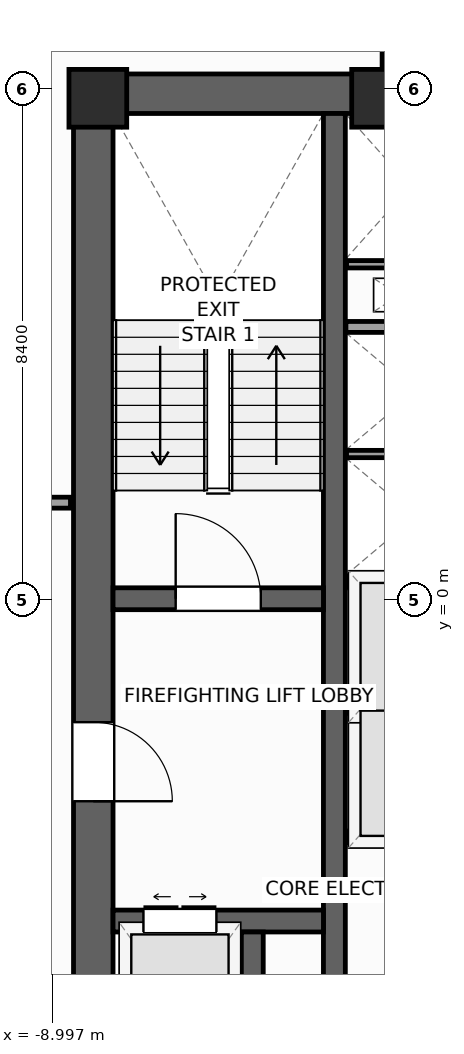
"""IFC4 building model, lengths in metres.
Left out: names, types, materials, properties, quantities, classifications, styles, units other than length and angle.
Written with IfcOpenShell. Run it as: python <this file> out.ifc"""

import sys

from ifc_helpers import new_model, si_unit, direction, frame, frame_2d, origin, origin_2d, place, context, subcontext, project, spatial, rectangle, extrude, source, transform, mapped, element, fill, save


model = new_model("IFC4")
c1 = context("Model", 3, precision=1e-05, world=origin(), true_north=direction((0.0, 1.0)))
c2 = subcontext(c1, "Body", "Model", "MODEL_VIEW")
j1 = project(units=[si_unit("LENGTHUNIT", "METRE"), si_unit("PLANEANGLEUNIT", "RADIAN")], contexts=[c1])
p1 = place(None, origin())
s1 = spatial("IfcSite", under=j1, at=p1, CompositionType="ELEMENT")
p2 = place(p1, origin())
s2 = spatial("IfcBuilding", under=s1, at=p2, CompositionType="ELEMENT")
p3 = place(p2, frame((0.0, 0.0, 160.4)))
s3 = spatial("IfcBuildingStorey", under=s2, at=p3, CompositionType="ELEMENT", Elevation=160.4)
p4 = place(p3, frame((-8.65, 8.325, 0.0), z_axis=(0.0, 0.0, 1.0), x_axis=(1.0, 0.0, 0.0)))
e1 = element("IfcWall", 1, at=p4, inside=s3, PredefinedType="SHEAR", context=c2, shape_type="SweptSolid", body=[
    extrude(rectangle(XDim=17.3, YDim=0.65, at=frame_2d((8.65, 0.0))), origin(), (0.0, 0.0, 1.0), 4.0),
])
p5 = place(p3, frame((-8.325, -8.0, 0.0), z_axis=(0.0, 0.0, 1.0), x_axis=(0.0, 1.0, 0.0)))
e2 = element("IfcWall", 2, at=p5, inside=s3, PredefinedType="SHEAR", context=c2, shape_type="SweptSolid", body=[
    extrude(rectangle(XDim=16.0, YDim=0.65, at=frame_2d((8.0, 0.0))), origin(), (0.0, 0.0, 1.0), 4.0),
])
p6 = place(p5, frame((4.69, 0.0, 0.0)))
e3 = element("IfcOpeningElement", 3, at=p6, cuts=e2, PredefinedType="OPENING", context=c2, shape_type="SweptSolid", body=[
    extrude(rectangle(XDim=1.3, YDim=2.2, at=frame_2d((0.65, 1.1))), frame((0.0, 0.335, 0.0), z_axis=(0.0, -1.0, 0.0), x_axis=(1.0, 0.0, 0.0)), (0.0, 0.0, 1.0), 0.67),
])
p7 = place(p3, frame((-4.36, -8.0, 0.0), z_axis=(0.0, 0.0, 1.0), x_axis=(0.0, 1.0, 0.0)))
e4 = element("IfcWall", 4, at=p7, inside=s3, PredefinedType="SHEAR", context=c2, shape_type="SweptSolid", body=[
    extrude(rectangle(XDim=16.0, YDim=0.36, at=frame_2d((8.0, 0.0))), origin(), (0.0, 0.0, 1.0), 4.0),
])
p8 = place(p3, frame((-8.0, 0.02, 0.0), z_axis=(0.0, 0.0, 1.0), x_axis=(1.0, 0.0, 0.0)))
e5 = element("IfcWall", 5, at=p8, inside=s3, PredefinedType="SHEAR", context=c2, shape_type="SweptSolid", body=[
    extrude(rectangle(XDim=3.46, YDim=0.36, at=frame_2d((1.73, 0.0))), origin(), (0.0, 0.0, 1.0), 4.0),
])
p9 = place(p8, frame((1.03, 0.0, 0.0)))
e6 = element("IfcOpeningElement", 6, at=p9, cuts=e5, PredefinedType="OPENING", context=c2, shape_type="SweptSolid", body=[
    extrude(rectangle(XDim=1.4, YDim=2.2, at=frame_2d((0.7, 1.1))), frame((0.0, 0.19, 0.0), z_axis=(0.0, -1.0, 0.0), x_axis=(1.0, 0.0, 0.0)), (0.0, 0.0, 1.0), 0.38),
])
p10 = place(p3, frame((-8.0, -5.28, 0.0), z_axis=(0.0, 0.0, 1.0), x_axis=(1.0, 0.0, 0.0)))
e7 = element("IfcWall", 7, at=p10, inside=s3, PredefinedType="SHEAR", context=c2, shape_type="SweptSolid", body=[
    extrude(rectangle(XDim=3.46, YDim=0.36, at=frame_2d((1.73, 0.0))), origin(), (0.0, 0.0, 1.0), 4.0),
])
p11 = place(p10, frame((0.5, 0.0, 0.0)))
e8 = element("IfcOpeningElement", 8, at=p11, cuts=e7, PredefinedType="OPENING", context=c2, shape_type="SweptSolid", body=[
    extrude(rectangle(XDim=1.2, YDim=2.25, at=frame_2d((0.6, 1.125))), frame((0.0, 0.19, 0.0), z_axis=(0.0, -1.0, 0.0), x_axis=(1.0, 0.0, 0.0)), (0.0, 0.0, 1.0), 0.38),
])
p12 = place(p3, frame((-5.71, -8.0, 0.0), z_axis=(0.0, 0.0, 1.0), x_axis=(0.0, 1.0, 0.0)))
e9 = element("IfcWall", 9, at=p12, inside=s3, PredefinedType="SHEAR", context=c2, shape_type="SweptSolid", body=[
    extrude(rectangle(XDim=2.54, YDim=0.36, at=frame_2d((1.27, 0.0))), origin(), (0.0, 0.0, 1.0), 4.0),
])
m1 = source(origin(), c2, "Body", "SweptSolid", [
    extrude(rectangle(XDim=0.95, YDim=0.95, at=origin_2d()), origin(), (0.0, 0.0, 1.0), 4.0),
])
for number, where, z_axis, x_axis in (
    (10, (-8.25, 8.25, 0.0), (0.0, 0.0, 1.0), (1.0, 0.0, 0.0)),
    (11, (-3.6, 8.25, 0.0), (0.0, 0.0, 1.0), (1.0, 0.0, 0.0)),
):
    element("IfcColumn", number, at=place(p3, frame(where, z_axis=z_axis, x_axis=x_axis)), inside=s3, PredefinedType="PILASTER", context=c2, shape_type="MappedRepresentation", body=[
        mapped(m1, transform((0.0, 0.0, 0.0), scale=1.0)),
    ])
for number, where, z_axis, x_axis in (
    (12, (-4.17, -3.9, 0.0), (0.0, 0.0, 1.0), (1.0, 0.0, 0.0)),
    (13, (-4.17, 0.3, 0.0), (0.0, 0.0, 1.0), (1.0, 0.0, 0.0)),
    (14, (-4.17, 4.49, 0.0), (0.0, 0.0, 1.0), (1.0, 0.0, 0.0)),
):
    element("IfcWall", number, at=place(p3, frame(where, z_axis=z_axis, x_axis=x_axis)), inside=s3, PredefinedType="PARTITIONING", context=c2, shape_type="SweptSolid", body=[
        extrude(rectangle(XDim=2.28, YDim=0.18, at=frame_2d((1.14, 0.0))), origin(), (0.0, 0.0, 1.0), 3.74),
    ])
for number, where, z_axis, x_axis in (
    (15, (-4.16, -1.8, 0.0), (0.0, 0.0, 1.0), (1.0, 0.0, 0.0)),
    (16, (-4.16, 2.4, 0.0), (0.0, 0.0, 1.0), (1.0, 0.0, 0.0)),
):
    element("IfcWall", number, at=place(p3, frame(where, z_axis=z_axis, x_axis=x_axis)), inside=s3, PredefinedType="PARTITIONING", context=c2, shape_type="SweptSolid", body=[
        extrude(rectangle(XDim=2.26, YDim=0.12, at=frame_2d((1.13, 0.0))), origin(), (0.0, 0.0, 1.0), 3.74),
    ])
p13 = place(p3, frame((-4.16, 5.52, 0.0), z_axis=(0.0, 0.0, 1.0), x_axis=(1.0, 0.0, 0.0)))
e17 = element("IfcWall", 17, at=p13, inside=s3, PredefinedType="PARTITIONING", context=c2, shape_type="SweptSolid", body=[
    extrude(rectangle(XDim=2.1, YDim=0.12, at=frame_2d((1.05, 0.0))), origin(), (0.0, 0.0, 1.0), 3.74),
])
p14 = place(p3, frame((-11.55, 1.6, 0.0), z_axis=(0.0, 0.0, 1.0), x_axis=(1.0, 0.0, 0.0)))
e18 = element("IfcWall", 18, at=p14, inside=s3, PredefinedType="PARTITIONING", context=c2, shape_type="SweptSolid", body=[
    extrude(rectangle(XDim=2.85, YDim=0.18, at=frame_2d((1.425, 0.0))), origin(), (0.0, 0.0, 1.0), 3.74),
])
p15 = place(p14, frame((0.875, 0.0, 0.0)))
e19 = element("IfcOpeningElement", 19, at=p15, cuts=e18, PredefinedType="OPENING", context=c2, shape_type="SweptSolid", body=[
    extrude(rectangle(XDim=1.1, YDim=2.2, at=frame_2d((0.55, 1.1))), frame((0.0, 0.1, 0.0), z_axis=(0.0, -1.0, 0.0), x_axis=(1.0, 0.0, 0.0)), (0.0, 0.0, 1.0), 0.2),
])
p16 = place(p3, frame((-3.5, 8.655, 0.0), z_axis=(0.0, 0.0, 1.0), x_axis=(0.0, 1.0, 0.0)))
e20 = element("IfcWall", 20, at=p16, inside=s3, PredefinedType="PARTITIONING", context=c2, shape_type="SweptSolid", body=[
    extrude(rectangle(XDim=19.411, YDim=0.15, at=frame_2d((9.706, 0.0))), origin(), (0.0, 0.0, 1.0), 3.74),
])
m2 = source(origin(), c2, "Body", "SweptSolid", [
    extrude(rectangle(XDim=1.4, YDim=2.2, at=frame_2d((0.7, 1.1))), frame((0.0, 0.025, 0.0), z_axis=(0.0, -1.0, 0.0), x_axis=(1.0, 0.0, 0.0)), (0.0, 0.0, 1.0), 0.05),
])
p17 = place(p9, origin())
e21 = element("IfcDoor", 21, at=p17, inside=s3, OperationType="SINGLE_SWING_LEFT", PredefinedType="DOOR", context=c2, shape_type="MappedRepresentation", body=[
    mapped(m2, transform((0.0, 0.0, 0.0), scale=1.0)),
])
fill(e6, e21)
m3 = source(origin(), c2, "Body", "SweptSolid", [
    extrude(rectangle(XDim=1.3, YDim=2.2, at=frame_2d((0.65, 1.1))), frame((0.0, 0.025, 0.0), z_axis=(0.0, -1.0, 0.0), x_axis=(1.0, 0.0, 0.0)), (0.0, 0.0, 1.0), 0.05),
])
p18 = place(p6, frame((1.3, 0.0, 0.0), z_axis=(0.0, 0.0, 1.0), x_axis=(-1.0, 0.0, 0.0)))
e22 = element("IfcDoor", 22, at=p18, inside=s3, OperationType="SINGLE_SWING_LEFT", PredefinedType="DOOR", context=c2, shape_type="MappedRepresentation", body=[
    mapped(m3, transform((0.0, 0.0, 0.0), scale=1.0)),
])
fill(e3, e22)
m4 = source(origin(), c2, "Body", "SweptSolid", [
    extrude(rectangle(XDim=1.2, YDim=2.25, at=frame_2d((0.6, 1.125))), frame((0.0, 0.025, 0.0), z_axis=(0.0, -1.0, 0.0), x_axis=(1.0, 0.0, 0.0)), (0.0, 0.0, 1.0), 0.05),
])
p19 = place(p11, origin())
e23 = element("IfcDoor", 23, at=p19, inside=s3, OperationType="DOUBLE_DOOR_SLIDING", PredefinedType="DOOR", context=c2, shape_type="MappedRepresentation", body=[
    mapped(m4, transform((0.0, 0.0, 0.0), scale=1.0)),
])
fill(e8, e23)
save(model, sys.argv[1])
